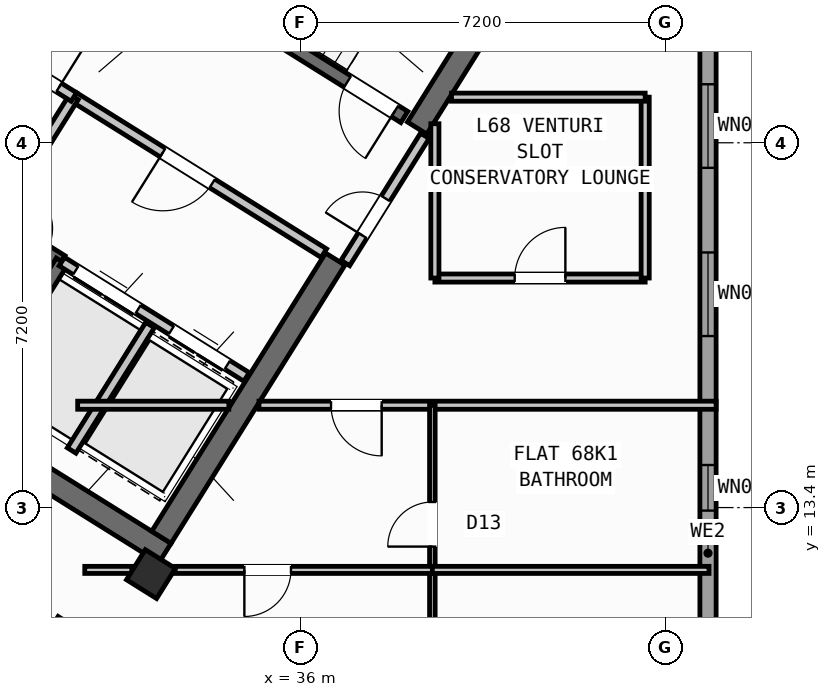
"""IFC4 building model, lengths in metres.
Left out: names, types, materials, properties, quantities, classifications, styles, units other than length and angle.
Written with IfcOpenShell. Run it as: python <this file> out.ifc"""

import sys

from ifc_helpers import new_model, si_unit, direction, frame, frame_2d, origin, origin_2d, place, context, subcontext, project, spatial, rectangle, hollow_rectangle, extrude, source, transform, mapped, element, fill, save


model = new_model("IFC4")
c1 = context("Model", 3, precision=1e-05, world=origin(), true_north=direction((0.0, 1.0)))
c2 = subcontext(c1, "Body", "Model", "MODEL_VIEW")
j1 = project(units=[si_unit("LENGTHUNIT", "METRE"), si_unit("PLANEANGLEUNIT", "RADIAN")], contexts=[c1])
p1 = place(None, origin())
s1 = spatial("IfcSite", under=j1, at=p1, CompositionType="ELEMENT")
p2 = place(p1, origin())
s2 = spatial("IfcBuilding", under=s1, at=p2, CompositionType="ELEMENT")
p3 = place(p2, frame((0.0, 0.0, 270.0)))
s3 = spatial("IfcBuildingStorey", under=s2, at=p3, CompositionType="ELEMENT", Elevation=270.0)
p4 = place(p3, frame((33.324, 12.503, 0.0), z_axis=(0.0, 0.0, 1.0), x_axis=(-0.848043529849, 0.529926571782, 0.0)))
e1 = element("IfcWall", 1, at=p4, inside=s3, PredefinedType="SHEAR", context=c2, shape_type="SweptSolid", body=[
    extrude(rectangle(XDim=13.04, YDim=0.45, at=frame_2d((6.52, 0.0))), origin(), (0.0, 0.0, 1.0), 3.35),
])
p5 = place(p3, frame((40.221, 23.965, 0.0), z_axis=(0.0, 0.0, 1.0), x_axis=(-0.529902075036, -0.848058836916, 0.0)))
e2 = element("IfcWall", 2, at=p5, inside=s3, PredefinedType="SHEAR", context=c2, shape_type="SweptSolid", body=[
    extrude(rectangle(XDim=3.625, YDim=0.45, at=frame_2d((1.812, 0.0))), origin(), (0.0, 0.0, 1.0), 3.35),
])
p6 = place(p3, frame((36.683, 18.304, 0.0), z_axis=(0.0, 0.0, 1.0), x_axis=(-0.529904039071, -0.848057609704, 0.0)))
e3 = element("IfcWall", 3, at=p6, inside=s3, PredefinedType="SHEAR", context=c2, shape_type="SweptSolid", body=[
    extrude(rectangle(XDim=6.475, YDim=0.45, at=frame_2d((3.238, 0.0))), origin(), (0.0, 0.0, 1.0), 3.35),
])
m1 = source(origin(), c2, "Body", "SweptSolid", [
    extrude(hollow_rectangle(XDim=0.7, YDim=0.7, WallThickness=0.028, at=origin_2d()), origin(), (0.0, 0.0, 1.0), 3.6),
])
p7 = place(p3, frame((33.046, 12.087, 0.0), z_axis=(0.0, 0.0, 1.0), x_axis=(-0.848048096156, 0.529919264233, 0.0)))
e4 = element("IfcColumn", 4, at=p7, inside=s3, PredefinedType="COLUMN", context=c2, shape_type="MappedRepresentation", body=[
    mapped(m1, transform((0.0, 0.0, 0.0), scale=1.0)),
])
p8 = place(p3, frame((44.04, 23.04, 0.0), z_axis=(0.0, 0.0, 1.0), x_axis=(0.0, -1.0, 0.0)))
e5 = element("IfcWall", 5, at=p8, inside=s3, PredefinedType="STANDARD", context=c2, shape_type="SweptSolid", body=[
    extrude(rectangle(XDim=21.08, YDim=0.32, at=frame_2d((10.54, 0.0))), origin(), (0.0, 0.0, 1.0), 3.35),
])
p9 = place(p8, frame((1.285, 0.0, 0.9)))
e6 = element("IfcOpeningElement", 6, at=p9, cuts=e5, PredefinedType="OPENING", context=c2, shape_type="SweptSolid", body=[
    extrude(rectangle(XDim=1.65, YDim=1.45, at=frame_2d((0.825, 0.725))), frame((0.0, 0.17, 0.0), z_axis=(0.0, -1.0, 0.0), x_axis=(1.0, 0.0, 0.0)), (0.0, 0.0, 1.0), 0.34),
])
p10 = place(p8, frame((4.605, 0.0, 0.9)))
e7 = element("IfcOpeningElement", 7, at=p10, cuts=e5, PredefinedType="OPENING", context=c2, shape_type="SweptSolid", body=[
    extrude(rectangle(XDim=1.65, YDim=1.45, at=frame_2d((0.825, 0.725))), frame((0.0, 0.17, 0.0), z_axis=(0.0, -1.0, 0.0), x_axis=(1.0, 0.0, 0.0)), (0.0, 0.0, 1.0), 0.34),
])
p11 = place(p8, frame((8.8, 0.0, 1.0)))
e8 = element("IfcOpeningElement", 8, at=p11, cuts=e5, PredefinedType="OPENING", context=c2, shape_type="SweptSolid", body=[
    extrude(rectangle(XDim=0.9, YDim=1.25, at=frame_2d((0.45, 0.625))), frame((0.0, 0.17, 0.0), z_axis=(0.0, -1.0, 0.0), x_axis=(1.0, 0.0, 0.0)), (0.0, 0.0, 1.0), 0.34),
])
p12 = place(p8, frame((12.189, 0.0, 1.0)))
e9 = element("IfcOpeningElement", 9, at=p12, cuts=e5, PredefinedType="OPENING", context=c2, shape_type="SweptSolid", body=[
    extrude(rectangle(XDim=0.9, YDim=1.25, at=frame_2d((0.45, 0.625))), frame((0.0, 0.17, 0.0), z_axis=(0.0, -1.0, 0.0), x_axis=(1.0, 0.0, 0.0)), (0.0, 0.0, 1.0), 0.34),
])
p13 = place(p8, frame((14.686, 0.0, 1.0)))
e10 = element("IfcOpeningElement", 10, at=p13, cuts=e5, PredefinedType="OPENING", context=c2, shape_type="SweptSolid", body=[
    extrude(rectangle(XDim=0.9, YDim=1.25, at=frame_2d((0.45, 0.625))), frame((0.0, 0.17, 0.0), z_axis=(0.0, -1.0, 0.0), x_axis=(1.0, 0.0, 0.0)), (0.0, 0.0, 1.0), 0.34),
])
p14 = place(p8, frame((18.337, 0.0, 0.9)))
e11 = element("IfcOpeningElement", 11, at=p14, cuts=e5, PredefinedType="OPENING", context=c2, shape_type="SweptSolid", body=[
    extrude(rectangle(XDim=1.35, YDim=1.45, at=frame_2d((0.675, 0.725))), frame((0.0, 0.17, 0.0), z_axis=(0.0, -1.0, 0.0), x_axis=(1.0, 0.0, 0.0)), (0.0, 0.0, 1.0), 0.34),
])
p15 = place(p3, frame((31.28, 18.261, 0.0), z_axis=(0.0, 0.0, 1.0), x_axis=(-0.848051618787, 0.529913626805, 0.0)))
e12 = element("IfcWall", 12, at=p15, inside=s3, PredefinedType="SHEAR", context=c2, shape_type="SweptSolid", body=[
    extrude(rectangle(XDim=7.46, YDim=0.26, at=frame_2d((3.73, 0.0))), origin(), (0.0, 0.0, 1.0), 3.35),
])
p16 = place(p15, frame((0.36, 0.0, 0.0)))
e13 = element("IfcOpeningElement", 13, at=p16, cuts=e12, PredefinedType="OPENING", context=c2, shape_type="SweptSolid", body=[
    extrude(rectangle(XDim=0.86, YDim=2.05, at=frame_2d((0.43, 1.025))), frame((0.0, 0.14, 0.0), z_axis=(0.0, -1.0, 0.0), x_axis=(1.0, 0.0, 0.0)), (0.0, 0.0, 1.0), 0.28),
])
p17 = place(p3, frame((31.288, 18.256, 0.0), z_axis=(0.0, 0.0, 1.0), x_axis=(-0.529943379326, -0.848033026897, 0.0)))
e14 = element("IfcWall", 14, at=p17, inside=s3, PredefinedType="SHEAR", context=c2, shape_type="SweptSolid", body=[
    extrude(rectangle(XDim=3.16, YDim=0.26, at=frame_2d((1.58, 0.0))), origin(), (0.0, 0.0, 1.0), 3.35),
])
p18 = place(p3, frame((38.046, 21.108, 0.0), z_axis=(0.0, 0.0, 1.0), x_axis=(-0.848054434086, 0.529909121291, 0.0)))
e15 = element("IfcWall", 15, at=p18, inside=s3, PredefinedType="SHEAR", context=c2, shape_type="SweptSolid", body=[
    extrude(rectangle(XDim=7.33, YDim=0.26, at=frame_2d((3.665, 0.0))), origin(), (0.0, 0.0, 1.0), 3.35),
])
p19 = place(p18, frame((0.22, 0.0, 0.0)))
e16 = element("IfcOpeningElement", 16, at=p19, cuts=e15, PredefinedType="OPENING", context=c2, shape_type="SweptSolid", body=[
    extrude(rectangle(XDim=1.1, YDim=2.1, at=frame_2d((0.55, 1.05))), frame((0.0, 0.14, 0.0), z_axis=(0.0, -1.0, 0.0), x_axis=(1.0, 0.0, 0.0)), (0.0, 0.0, 1.0), 0.28),
])
p20 = place(p3, frame((34.933, 15.978, 0.0), z_axis=(0.0, 0.0, 1.0), x_axis=(-0.848055739377, 0.529907032327, 0.0)))
e17 = element("IfcWall", 17, at=p20, inside=s3, PredefinedType="STANDARD", context=c2, shape_type="SweptSolid", body=[
    extrude(rectangle(XDim=4.298, YDim=0.2, at=frame_2d((2.149, 0.0))), origin(), (0.0, 0.0, 1.0), 3.34),
])
p21 = place(p20, frame((0.448, 0.0, 0.0)))
e18 = element("IfcOpeningElement", 18, at=p21, cuts=e17, PredefinedType="OPENING", context=c2, shape_type="SweptSolid", body=[
    extrude(rectangle(XDim=1.3, YDim=2.2, at=frame_2d((0.65, 1.1))), frame((0.0, 0.11, 0.0), z_axis=(0.0, -1.0, 0.0), x_axis=(1.0, 0.0, 0.0)), (0.0, 0.0, 1.0), 0.22),
])
p22 = place(p20, frame((2.523, 0.0, 0.0)))
e19 = element("IfcOpeningElement", 19, at=p22, cuts=e17, PredefinedType="OPENING", context=c2, shape_type="SweptSolid", body=[
    extrude(rectangle(XDim=1.45, YDim=2.25, at=frame_2d((0.725, 1.125))), frame((0.0, 0.11, 0.0), z_axis=(0.0, -1.0, 0.0), x_axis=(1.0, 0.0, 0.0)), (0.0, 0.0, 1.0), 0.22),
])
p23 = place(p3, frame((36.459, 18.421, 0.0), z_axis=(0.0, 0.0, 1.0), x_axis=(-0.848059591691, 0.529900867089, 0.0)))
e20 = element("IfcWall", 20, at=p23, inside=s3, PredefinedType="STANDARD", context=c2, shape_type="SweptSolid", body=[
    extrude(rectangle(XDim=5.818, YDim=0.2, at=frame_2d((2.909, 0.0))), origin(), (0.0, 0.0, 1.0), 3.34),
])
p24 = place(p23, frame((2.598, 0.0, 0.0)))
e21 = element("IfcOpeningElement", 21, at=p24, cuts=e20, PredefinedType="OPENING", context=c2, shape_type="SweptSolid", body=[
    extrude(rectangle(XDim=1.15, YDim=2.1, at=frame_2d((0.575, 1.05))), frame((0.0, 0.11, 0.0), z_axis=(0.0, -1.0, 0.0), x_axis=(1.0, 0.0, 0.0)), (0.0, 0.0, 1.0), 0.22),
])
p25 = place(p3, frame((33.029, 17.003, 0.0), z_axis=(0.0, 0.0, 1.0), x_axis=(-0.529916267533, -0.848049968695, 0.0)))
e22 = element("IfcWall", 22, at=p25, inside=s3, PredefinedType="STANDARD", context=c2, shape_type="SweptSolid", body=[
    extrude(rectangle(XDim=2.92, YDim=0.2, at=frame_2d((1.46, 0.0))), origin(), (0.0, 0.0, 1.0), 3.34),
])
p26 = place(p3, frame((31.525, 21.504, 0.0), z_axis=(0.0, 0.0, 1.0), x_axis=(-0.529907497854, -0.848055448493, 0.0)))
e23 = element("IfcWall", 23, at=p26, inside=s3, PredefinedType="STANDARD", context=c2, shape_type="SweptSolid", body=[
    extrude(rectangle(XDim=2.88, YDim=0.2, at=frame_2d((1.44, 0.0))), origin(), (0.0, 0.0, 1.0), 3.34),
])
p27 = place(p3, frame((31.525, 21.504, 0.0), z_axis=(0.0, 0.0, 1.0), x_axis=(-0.848042066329, 0.529928913853, 0.0)))
e24 = element("IfcWall", 24, at=p27, inside=s3, PredefinedType="STANDARD", context=c2, shape_type="SweptSolid", body=[
    extrude(rectangle(XDim=6.268, YDim=0.2, at=frame_2d((3.134, 0.0))), origin(), (0.0, 0.0, 1.0), 3.34),
])
p28 = place(p27, frame((4.4, 0.0, 0.0)))
e25 = element("IfcOpeningElement", 25, at=p28, cuts=e24, PredefinedType="OPENING", context=c2, shape_type="SweptSolid", body=[
    extrude(rectangle(XDim=0.86, YDim=2.05, at=frame_2d((0.43, 1.025))), frame((0.0, 0.11, 0.0), z_axis=(0.0, -1.0, 0.0), x_axis=(1.0, 0.0, 0.0)), (0.0, 0.0, 1.0), 0.22),
])
p29 = place(p27, frame((0.35, 0.0, 0.0)))
e26 = element("IfcOpeningElement", 26, at=p29, cuts=e24, PredefinedType="OPENING", context=c2, shape_type="SweptSolid", body=[
    extrude(rectangle(XDim=0.86, YDim=2.05, at=frame_2d((0.43, 1.025))), frame((0.0, 0.11, 0.0), z_axis=(0.0, -1.0, 0.0), x_axis=(1.0, 0.0, 0.0)), (0.0, 0.0, 1.0), 0.22),
])
p30 = place(p3, frame((32.164, 10.374, 0.0), z_axis=(0.0, 0.0, 1.0), x_axis=(-0.848044107957, 0.529925646633, 0.0)))
e27 = element("IfcWall", 27, at=p30, inside=s3, PredefinedType="PARTITIONING", context=c2, shape_type="SweptSolid", body=[
    extrude(rectangle(XDim=15.57, YDim=0.16, at=frame_2d((7.785, 0.0))), origin(), (0.0, 0.0, 1.0), 3.34),
])
p31 = place(p30, frame((10.83, 0.0, 0.0)))
e28 = element("IfcOpeningElement", 28, at=p31, cuts=e27, PredefinedType="OPENING", context=c2, shape_type="SweptSolid", body=[
    extrude(rectangle(XDim=1.0, YDim=2.1, at=frame_2d((0.5, 1.05))), frame((0.0, 0.09, 0.0), z_axis=(0.0, -1.0, 0.0), x_axis=(1.0, 0.0, 0.0)), (0.0, 0.0, 1.0), 0.18),
])
p32 = place(p3, frame((31.282, 11.208, 0.0), z_axis=(0.0, 0.0, 1.0), x_axis=(-0.529938869374, -0.84803584519, 0.0)))
e29 = element("IfcWall", 29, at=p32, inside=s3, PredefinedType="PARTITIONING", context=c2, shape_type="SweptSolid", body=[
    extrude(rectangle(XDim=5.48, YDim=0.16, at=frame_2d((2.74, 0.0))), origin(), (0.0, 0.0, 1.0), 3.34),
])
p33 = place(p3, frame((38.451, 20.737, 0.0), z_axis=(0.0, 0.0, 1.0), x_axis=(-0.529924799939, -0.848044637038, 0.0)))
e30 = element("IfcWall", 30, at=p33, inside=s3, PredefinedType="STANDARD", context=c2, shape_type="SweptSolid", body=[
    extrude(rectangle(XDim=2.96, YDim=0.2, at=frame_2d((1.48, 0.0))), origin(), (0.0, 0.0, 1.0), 3.34),
])
p34 = place(p33, frame((1.46, 0.0, 0.0)))
e31 = element("IfcOpeningElement", 31, at=p34, cuts=e30, PredefinedType="OPENING", context=c2, shape_type="SweptSolid", body=[
    extrude(rectangle(XDim=0.86, YDim=2.05, at=frame_2d((0.43, 1.025))), frame((0.0, 0.11, 0.0), z_axis=(0.0, -1.0, 0.0), x_axis=(1.0, 0.0, 0.0)), (0.0, 0.0, 1.0), 0.22),
])
p35 = place(p3, frame((31.6, 15.42, 0.0), z_axis=(0.0, 0.0, 1.0), x_axis=(1.0, 0.0, 0.0)))
e32 = element("IfcWall", 32, at=p35, inside=s3, PredefinedType="PARTITIONING", context=c2, shape_type="SweptSolid", body=[
    extrude(rectangle(XDim=2.984, YDim=0.16, at=frame_2d((1.492, 0.0))), origin(), (0.0, 0.0, 1.0), 3.34),
])
p36 = place(p3, frame((35.178, 15.42, 0.0), z_axis=(0.0, 0.0, 1.0), x_axis=(1.0, 0.0, 0.0)))
e33 = element("IfcWall", 33, at=p36, inside=s3, PredefinedType="PARTITIONING", context=c2, shape_type="SweptSolid", body=[
    extrude(rectangle(XDim=9.021, YDim=0.16, at=frame_2d((4.511, 0.0))), origin(), (0.0, 0.0, 1.0), 3.34),
])
p37 = place(p36, frame((1.422, 0.0, 0.0)))
e34 = element("IfcOpeningElement", 34, at=p37, cuts=e33, PredefinedType="OPENING", context=c2, shape_type="SweptSolid", body=[
    extrude(rectangle(XDim=1.0, YDim=2.1, at=frame_2d((0.5, 1.05))), frame((0.0, 0.09, 0.0), z_axis=(0.0, -1.0, 0.0), x_axis=(1.0, 0.0, 0.0)), (0.0, 0.0, 1.0), 0.18),
])
p38 = place(p3, frame((38.65, 17.93, 0.0), z_axis=(0.0, 0.0, 1.0), x_axis=(1.0, 0.0, 0.0)))
e35 = element("IfcWall", 35, at=p38, inside=s3, PredefinedType="PARTITIONING", context=c2, shape_type="SweptSolid", body=[
    extrude(rectangle(XDim=4.15, YDim=0.16, at=frame_2d((2.075, 0.0))), origin(), (0.0, 0.0, 1.0), 3.34),
])
p39 = place(p38, frame((1.575, 0.0, 0.0)))
e36 = element("IfcOpeningElement", 36, at=p39, cuts=e35, PredefinedType="OPENING", context=c2, shape_type="SweptSolid", body=[
    extrude(rectangle(XDim=1.0, YDim=2.1, at=frame_2d((0.5, 1.05))), frame((0.0, 0.09, 0.0), z_axis=(0.0, -1.0, 0.0), x_axis=(1.0, 0.0, 0.0)), (0.0, 0.0, 1.0), 0.18),
])
p40 = place(p3, frame((38.65, 17.93, 0.0), z_axis=(0.0, 0.0, 1.0), x_axis=(0.0, 1.0, 0.0)))
e37 = element("IfcWall", 37, at=p40, inside=s3, PredefinedType="PARTITIONING", context=c2, shape_type="SweptSolid", body=[
    extrude(rectangle(XDim=3.046, YDim=0.16, at=frame_2d((1.523, 0.0))), origin(), (0.0, 0.0, 1.0), 3.34),
])
p41 = place(p3, frame((42.8, 17.93, 0.0), z_axis=(0.0, 0.0, 1.0), x_axis=(0.0, 1.0, 0.0)))
e38 = element("IfcWall", 38, at=p41, inside=s3, PredefinedType="PARTITIONING", context=c2, shape_type="SweptSolid", body=[
    extrude(rectangle(XDim=3.57, YDim=0.16, at=frame_2d((1.785, 0.0))), origin(), (0.0, 0.0, 1.0), 3.34),
])
p42 = place(p3, frame((38.978, 21.5, 0.0), z_axis=(0.0, 0.0, 1.0), x_axis=(1.0, 0.0, 0.0)))
e39 = element("IfcWall", 39, at=p42, inside=s3, PredefinedType="PARTITIONING", context=c2, shape_type="SweptSolid", body=[
    extrude(rectangle(XDim=3.823, YDim=0.16, at=frame_2d((1.911, 0.0))), origin(), (0.0, 0.0, 1.0), 3.34),
])
p43 = place(p3, frame((38.6, 1.96, 0.0), z_axis=(0.0, 0.0, 1.0), x_axis=(0.0, 1.0, 0.0)))
e40 = element("IfcWall", 40, at=p43, inside=s3, PredefinedType="PARTITIONING", context=c2, shape_type="SweptSolid", body=[
    extrude(rectangle(XDim=13.46, YDim=0.11, at=frame_2d((6.73, 0.0))), origin(), (0.0, 0.0, 1.0), 3.34),
])
p44 = place(p43, frame((5.2, 0.0, 0.0)))
e41 = element("IfcOpeningElement", 41, at=p44, cuts=e40, PredefinedType="OPENING", context=c2, shape_type="SweptSolid", body=[
    extrude(rectangle(XDim=0.92, YDim=2.08, at=frame_2d((0.46, 1.04))), frame((0.0, 0.065, 0.0), z_axis=(0.0, -1.0, 0.0), x_axis=(1.0, 0.0, 0.0)), (0.0, 0.0, 1.0), 0.13),
])
p45 = place(p43, frame((10.67, 0.0, 0.0)))
e42 = element("IfcOpeningElement", 42, at=p45, cuts=e40, PredefinedType="OPENING", context=c2, shape_type="SweptSolid", body=[
    extrude(rectangle(XDim=0.88, YDim=2.08, at=frame_2d((0.44, 1.04))), frame((0.0, 0.065, 0.0), z_axis=(0.0, -1.0, 0.0), x_axis=(1.0, 0.0, 0.0)), (0.0, 0.0, 1.0), 0.13),
])
p46 = place(p3, frame((31.74, 12.17, 0.0), z_axis=(0.0, 0.0, 1.0), x_axis=(1.0, 0.0, 0.0)))
e43 = element("IfcWall", 43, at=p46, inside=s3, PredefinedType="PLUMBINGWALL", context=c2, shape_type="SweptSolid", body=[
    extrude(rectangle(XDim=0.931, YDim=0.14, at=frame_2d((0.466, 0.0))), origin(), (0.0, 0.0, 1.0), 3.34),
])
p47 = place(p3, frame((33.525, 12.17, 0.0), z_axis=(0.0, 0.0, 1.0), x_axis=(1.0, 0.0, 0.0)))
e44 = element("IfcWall", 44, at=p47, inside=s3, PredefinedType="PLUMBINGWALL", context=c2, shape_type="SweptSolid", body=[
    extrude(rectangle(XDim=5.075, YDim=0.14, at=frame_2d((2.538, 0.0))), origin(), (0.0, 0.0, 1.0), 3.34),
])
p48 = place(p47, frame((1.365, 0.0, 0.0)))
e45 = element("IfcOpeningElement", 45, at=p48, cuts=e44, PredefinedType="OPENING", context=c2, shape_type="SweptSolid", body=[
    extrude(rectangle(XDim=0.92, YDim=2.08, at=frame_2d((0.46, 1.04))), frame((0.0, 0.08, 0.0), z_axis=(0.0, -1.0, 0.0), x_axis=(1.0, 0.0, 0.0)), (0.0, 0.0, 1.0), 0.16),
])
p49 = place(p3, frame((38.6, 12.17, 0.0), z_axis=(0.0, 0.0, 1.0), x_axis=(1.0, 0.0, 0.0)))
e46 = element("IfcWall", 46, at=p49, inside=s3, PredefinedType="PLUMBINGWALL", context=c2, shape_type="SweptSolid", body=[
    extrude(rectangle(XDim=5.46, YDim=0.14, at=frame_2d((2.73, 0.0))), origin(), (0.0, 0.0, 1.0), 3.34),
])
m2 = source(origin(), c2, "Body", "SweptSolid", [
    extrude(rectangle(XDim=1.65, YDim=1.45, at=frame_2d((0.825, 0.725))), frame((0.0, 0.03, 0.0), z_axis=(0.0, -1.0, 0.0), x_axis=(1.0, 0.0, 0.0)), (0.0, 0.0, 1.0), 0.06),
])
p50 = place(p9, origin())
e47 = element("IfcWindow", 47, at=p50, inside=s3, PartitioningType="SINGLE_PANEL", PredefinedType="WINDOW", context=c2, shape_type="MappedRepresentation", body=[
    mapped(m2, transform((0.0, 0.0, 0.0), scale=1.0)),
])
fill(e6, e47)
p51 = place(p10, origin())
e48 = element("IfcWindow", 48, at=p51, inside=s3, PartitioningType="SINGLE_PANEL", PredefinedType="WINDOW", context=c2, shape_type="MappedRepresentation", body=[
    mapped(m2, transform((0.0, 0.0, 0.0), scale=1.0)),
])
fill(e7, e48)
m3 = source(origin(), c2, "Body", "SweptSolid", [
    extrude(rectangle(XDim=0.9, YDim=1.25, at=frame_2d((0.45, 0.625))), frame((0.0, 0.03, 0.0), z_axis=(0.0, -1.0, 0.0), x_axis=(1.0, 0.0, 0.0)), (0.0, 0.0, 1.0), 0.06),
])
p52 = place(p11, origin())
e49 = element("IfcWindow", 49, at=p52, inside=s3, PartitioningType="SINGLE_PANEL", PredefinedType="WINDOW", context=c2, shape_type="MappedRepresentation", body=[
    mapped(m3, transform((0.0, 0.0, 0.0), scale=1.0)),
])
fill(e8, e49)
m4 = source(origin(), c2, "Body", "SweptSolid", [
    extrude(rectangle(XDim=1.1, YDim=2.1, at=frame_2d((0.55, 1.05))), frame((0.0, 0.025, 0.0), z_axis=(0.0, -1.0, 0.0), x_axis=(1.0, 0.0, 0.0)), (0.0, 0.0, 1.0), 0.05),
])
p53 = place(p19, origin())
e50 = element("IfcDoor", 50, at=p53, inside=s3, OperationType="SINGLE_SWING_LEFT", PredefinedType="DOOR", context=c2, shape_type="MappedRepresentation", body=[
    mapped(m4, transform((0.0, 0.0, 0.0), scale=1.0)),
])
fill(e16, e50)
m5 = source(origin(), c2, "Body", "SweptSolid", [
    extrude(rectangle(XDim=1.15, YDim=2.1, at=frame_2d((0.575, 1.05))), frame((0.0, 0.025, 0.0), z_axis=(0.0, -1.0, 0.0), x_axis=(1.0, 0.0, 0.0)), (0.0, 0.0, 1.0), 0.05),
])
p54 = place(p24, origin())
e51 = element("IfcDoor", 51, at=p54, inside=s3, OperationType="SINGLE_SWING_RIGHT", PredefinedType="DOOR", context=c2, shape_type="MappedRepresentation", body=[
    mapped(m5, transform((0.0, 0.0, 0.0), scale=1.0)),
])
fill(e21, e51)
m6 = source(origin(), c2, "Body", "SweptSolid", [
    extrude(rectangle(XDim=1.3, YDim=2.2, at=frame_2d((0.65, 1.1))), frame((0.0, 0.025, 0.0), z_axis=(0.0, -1.0, 0.0), x_axis=(1.0, 0.0, 0.0)), (0.0, 0.0, 1.0), 0.05),
])
p55 = place(p21, origin())
e52 = element("IfcDoor", 52, at=p55, inside=s3, OperationType="DOUBLE_DOOR_SLIDING", PredefinedType="DOOR", context=c2, shape_type="MappedRepresentation", body=[
    mapped(m6, transform((0.0, 0.0, 0.0), scale=1.0)),
])
fill(e18, e52)
m7 = source(origin(), c2, "Body", "SweptSolid", [
    extrude(rectangle(XDim=1.45, YDim=2.25, at=frame_2d((0.725, 1.125))), frame((0.0, 0.025, 0.0), z_axis=(0.0, -1.0, 0.0), x_axis=(1.0, 0.0, 0.0)), (0.0, 0.0, 1.0), 0.05),
])
p56 = place(p22, origin())
e53 = element("IfcDoor", 53, at=p56, inside=s3, OperationType="DOUBLE_DOOR_SLIDING", PredefinedType="DOOR", context=c2, shape_type="MappedRepresentation", body=[
    mapped(m7, transform((0.0, 0.0, 0.0), scale=1.0)),
])
fill(e19, e53)
m8 = source(origin(), c2, "Body", "SweptSolid", [
    extrude(rectangle(XDim=0.86, YDim=2.05, at=frame_2d((0.43, 1.025))), frame((0.0, 0.025, 0.0), z_axis=(0.0, -1.0, 0.0), x_axis=(1.0, 0.0, 0.0)), (0.0, 0.0, 1.0), 0.05),
])
p57 = place(p29, frame((0.86, 0.0, 0.0), z_axis=(0.0, 0.0, 1.0), x_axis=(-1.0, 0.0, 0.0)))
e54 = element("IfcDoor", 54, at=p57, inside=s3, OperationType="SINGLE_SWING_RIGHT", PredefinedType="DOOR", context=c2, shape_type="MappedRepresentation", body=[
    mapped(m8, transform((0.0, 0.0, 0.0), scale=1.0)),
])
fill(e26, e54)
m9 = source(origin(), c2, "Body", "SweptSolid", [
    extrude(rectangle(XDim=1.0, YDim=2.1, at=frame_2d((0.5, 1.05))), frame((0.0, 0.025, 0.0), z_axis=(0.0, -1.0, 0.0), x_axis=(1.0, 0.0, 0.0)), (0.0, 0.0, 1.0), 0.05),
])
p58 = place(p39, origin())
e55 = element("IfcDoor", 55, at=p58, inside=s3, OperationType="SINGLE_SWING_RIGHT", PredefinedType="DOOR", context=c2, shape_type="MappedRepresentation", body=[
    mapped(m9, transform((0.0, 0.0, 0.0), scale=1.0)),
])
fill(e36, e55)
p59 = place(p34, frame((0.86, 0.0, 0.0), z_axis=(0.0, 0.0, 1.0), x_axis=(-1.0, 0.0, 0.0)))
e56 = element("IfcDoor", 56, at=p59, inside=s3, OperationType="SINGLE_SWING_LEFT", PredefinedType="DOOR", context=c2, shape_type="MappedRepresentation", body=[
    mapped(m8, transform((0.0, 0.0, 0.0), scale=1.0)),
])
fill(e31, e56)
p60 = place(p37, frame((1.0, 0.0, 0.0), z_axis=(0.0, 0.0, 1.0), x_axis=(-1.0, 0.0, 0.0)))
e57 = element("IfcDoor", 57, at=p60, inside=s3, OperationType="SINGLE_SWING_LEFT", PredefinedType="DOOR", context=c2, shape_type="MappedRepresentation", body=[
    mapped(m9, transform((0.0, 0.0, 0.0), scale=1.0)),
])
fill(e34, e57)
m10 = source(origin(), c2, "Body", "SweptSolid", [
    extrude(rectangle(XDim=0.92, YDim=2.08, at=frame_2d((0.46, 1.04))), frame((0.0, 0.025, 0.0), z_axis=(0.0, -1.0, 0.0), x_axis=(1.0, 0.0, 0.0)), (0.0, 0.0, 1.0), 0.05),
])
p61 = place(p48, frame((0.92, 0.0, 0.0), z_axis=(0.0, 0.0, 1.0), x_axis=(-1.0, 0.0, 0.0)))
e58 = element("IfcDoor", 58, at=p61, inside=s3, OperationType="SINGLE_SWING_RIGHT", PredefinedType="DOOR", context=c2, shape_type="MappedRepresentation", body=[
    mapped(m10, transform((0.0, 0.0, 0.0), scale=1.0)),
])
fill(e45, e58)
m11 = source(origin(), c2, "Body", "SweptSolid", [
    extrude(rectangle(XDim=0.88, YDim=2.08, at=frame_2d((0.44, 1.04))), frame((0.0, 0.025, 0.0), z_axis=(0.0, -1.0, 0.0), x_axis=(1.0, 0.0, 0.0)), (0.0, 0.0, 1.0), 0.05),
])
p62 = place(p45, origin())
e59 = element("IfcDoor", 59, at=p62, inside=s3, OperationType="SINGLE_SWING_LEFT", PredefinedType="DOOR", context=c2, shape_type="MappedRepresentation", body=[
    mapped(m11, transform((0.0, 0.0, 0.0), scale=1.0)),
])
fill(e42, e59)
save(model, sys.argv[1])
